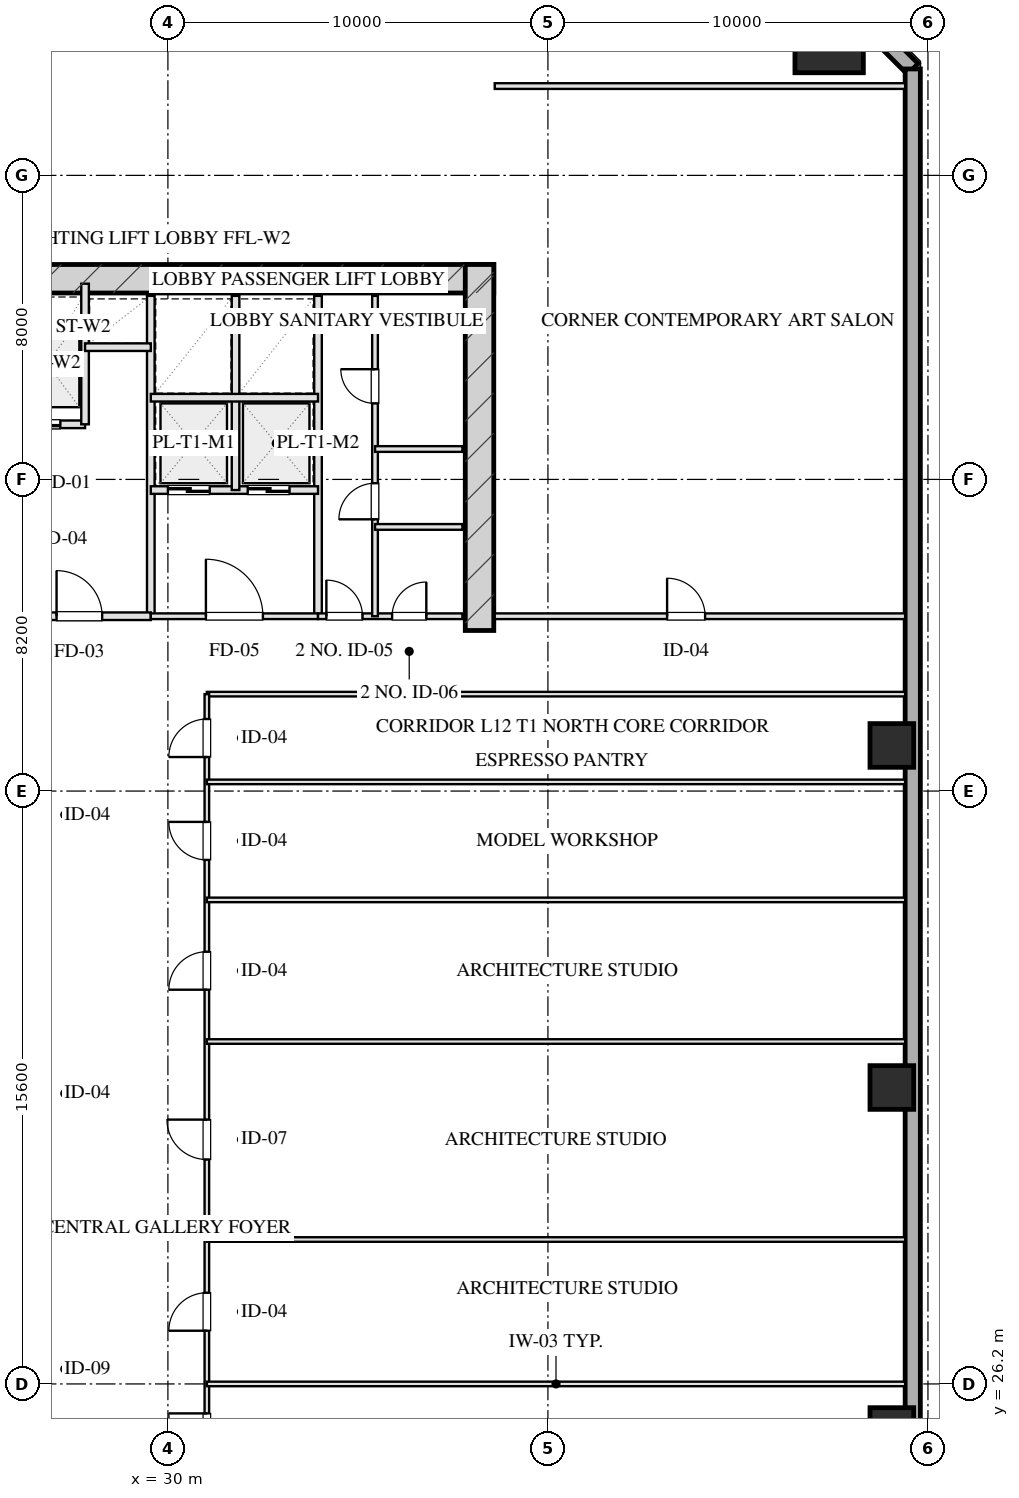
"""IFC4 building model, lengths in metres.
Left out: names, types, materials, properties, quantities, classifications, styles, units other than length and angle.
Written with IfcOpenShell. Run it as: python <this file> out.ifc"""

import sys

from ifc_helpers import new_model, si_unit, direction, frame, frame_2d, origin, origin_2d, place, context, subcontext, project, spatial, rectangle, hollow_rectangle, extrude, element, fill, save


model = new_model("IFC4")
c1 = context("Model", 3, precision=1e-05, world=origin(), true_north=direction((0.0, 1.0)))
c2 = subcontext(c1, "Body", "Model", "MODEL_VIEW")
j1 = project(units=[si_unit("LENGTHUNIT", "METRE"), si_unit("PLANEANGLEUNIT", "RADIAN")], contexts=[c1])
p1 = place(None, origin())
s1 = spatial("IfcSite", under=j1, at=p1, CompositionType="ELEMENT")
p2 = place(p1, origin())
s2 = spatial("IfcBuilding", under=s1, at=p2, CompositionType="ELEMENT")
p3 = place(p2, frame((0.0, 0.0, 54.05)))
s3 = spatial("IfcBuildingStorey", under=s2, at=p3, CompositionType="ELEMENT", Elevation=54.05)
p4 = place(p3, frame((21.425, 55.28, 0.0), z_axis=(0.0, 0.0, 1.0), x_axis=(1.0, 0.0, 0.0)))
e1 = element("IfcWall", 1, at=p4, inside=s3, PredefinedType="SHEAR", context=c2, shape_type="SweptSolid", body=[
    extrude(rectangle(XDim=17.15, YDim=0.75, at=frame_2d((8.575, 0.0))), origin(), (0.0, 0.0, 1.0), 3.45),
])
p5 = place(p3, frame((38.2, 46.025, 0.0), z_axis=(0.0, 0.0, 1.0), x_axis=(0.0, 1.0, 0.0)))
e2 = element("IfcWall", 2, at=p5, inside=s3, PredefinedType="SHEAR", context=c2, shape_type="SweptSolid", body=[
    extrude(rectangle(XDim=9.63, YDim=0.75, at=frame_2d((4.815, 0.0))), origin(), (0.0, 0.0, 1.0), 3.45),
])
p6 = place(p3, frame((47.4, 61.6, 0.0), z_axis=(0.0, 0.0, 1.0), x_axis=(1.0, 0.0, 0.0)))
e3 = element("IfcColumn", 3, at=p6, inside=s3, PredefinedType="COLUMN", context=c2, shape_type="SweptSolid", body=[
    extrude(hollow_rectangle(XDim=1.8, YDim=1.8, WallThickness=0.06, at=origin_2d()), origin(), (0.0, 0.0, 1.0), 3.451),
])
for number, where, z_axis, x_axis in (
    (4, (49.05, 25.0, 0.0), (0.0, 0.0, 1.0), (1.0, 0.0, 0.0)),
    (5, (49.05, 34.0, 0.0), (0.0, 0.0, 1.0), (1.0, 0.0, 0.0)),
    (6, (49.05, 43.0, 0.0), (0.0, 0.0, 1.0), (1.0, 0.0, 0.0)),
):
    element("IfcColumn", number, at=place(p3, frame(where, z_axis=z_axis, x_axis=x_axis)), inside=s3, PredefinedType="COLUMN", context=c2, shape_type="SweptSolid", body=[
        extrude(hollow_rectangle(XDim=1.15, YDim=1.15, WallThickness=0.04, at=origin_2d()), origin(), (0.0, 0.0, 1.0), 3.451),
    ])
p7 = place(p3, frame((46.6, 63.8, 0.0), z_axis=(0.0, 0.0, 1.0), x_axis=(0.707106781187, -0.707106781187, 0.0)))
e7 = element("IfcWall", 7, at=p7, inside=s3, PredefinedType="SOLIDWALL", context=c2, shape_type="SweptSolid", body=[
    extrude(rectangle(XDim=4.243, YDim=0.4, at=frame_2d((2.121, 0.0))), origin(), (0.0, 0.0, 1.0), 2.61),
])
p8 = place(p3, frame((49.6, 60.8, 0.0), z_axis=(0.0, 0.0, 1.0), x_axis=(0.0, -1.0, 0.0)))
e8 = element("IfcWall", 8, at=p8, inside=s3, PredefinedType="SOLIDWALL", context=c2, shape_type="SweptSolid", body=[
    extrude(rectangle(XDim=53.6, YDim=0.4, at=frame_2d((26.8, 0.0))), origin(), (0.0, 0.0, 1.0), 2.61),
])
p9 = place(p3, frame((29.55, 46.4, 0.0), z_axis=(0.0, 0.0, 1.0), x_axis=(0.0, 1.0, 0.0)))
e9 = element("IfcWall", 9, at=p9, inside=s3, PredefinedType="PARTITIONING", context=c2, shape_type="SweptSolid", body=[
    extrude(rectangle(XDim=8.43, YDim=0.2, at=frame_2d((4.215, 0.0))), origin(), (0.0, 0.0, 1.0), 3.175),
])
p10 = place(p3, frame((25.72, 46.4, 0.0), z_axis=(0.0, 0.0, 1.0), x_axis=(1.0, 0.0, 0.0)))
e10 = element("IfcWall", 10, at=p10, inside=s3, PredefinedType="PARTITIONING", context=c2, shape_type="SweptSolid", body=[
    extrude(rectangle(XDim=3.83, YDim=0.2, at=frame_2d((1.915, 0.0))), origin(), (0.0, 0.0, 1.0), 3.175),
])
p11 = place(p10, frame((1.35, 0.0, 0.0)))
e11 = element("IfcOpeningElement", 11, at=p11, cuts=e10, PredefinedType="OPENING", context=c2, shape_type="SweptSolid", body=[
    extrude(rectangle(XDim=1.2, YDim=2.05, at=frame_2d((0.6, 1.025))), frame((0.0, 0.11, 0.0), z_axis=(0.0, -1.0, 0.0), x_axis=(1.0, 0.0, 0.0)), (0.0, 0.0, 1.0), 0.22),
])
p12 = place(p3, frame((25.72, 51.45, 0.0), z_axis=(0.0, 0.0, 1.0), x_axis=(1.0, 0.0, 0.0)))
e12 = element("IfcWall", 12, at=p12, inside=s3, PredefinedType="PARTITIONING", context=c2, shape_type="SweptSolid", body=[
    extrude(rectangle(XDim=2.1, YDim=0.2, at=frame_2d((1.05, 0.0))), origin(), (0.0, 0.0, 1.0), 3.175),
])
p13 = place(p12, frame((0.35, 0.0, 0.0)))
e13 = element("IfcOpeningElement", 13, at=p13, cuts=e12, PredefinedType="OPENING", context=c2, shape_type="SweptSolid", body=[
    extrude(rectangle(XDim=1.1, YDim=2.05, at=frame_2d((0.55, 1.025))), frame((0.0, 0.11, 0.0), z_axis=(0.0, -1.0, 0.0), x_axis=(1.0, 0.0, 0.0)), (0.0, 0.0, 1.0), 0.22),
])
p14 = place(p3, frame((27.82, 51.45, 0.0), z_axis=(0.0, 0.0, 1.0), x_axis=(0.0, 1.0, 0.0)))
e14 = element("IfcWall", 14, at=p14, inside=s3, PredefinedType="PARTITIONING", context=c2, shape_type="SweptSolid", body=[
    extrude(rectangle(XDim=3.7, YDim=0.2, at=frame_2d((1.85, 0.0))), origin(), (0.0, 0.0, 1.0), 3.175),
])
p15 = place(p3, frame((27.82, 53.48, 0.0), z_axis=(0.0, 0.0, 1.0), x_axis=(1.0, 0.0, 0.0)))
e15 = element("IfcWall", 15, at=p15, inside=s3, PredefinedType="PARTITIONING", context=c2, shape_type="SweptSolid", body=[
    extrude(rectangle(XDim=1.73, YDim=0.2, at=frame_2d((0.865, 0.0))), origin(), (0.0, 0.0, 1.0), 3.175),
])
p16 = place(p3, frame((33.95, 46.4, 0.0), z_axis=(0.0, 0.0, 1.0), x_axis=(0.0, 1.0, 0.0)))
e16 = element("IfcWall", 16, at=p16, inside=s3, PredefinedType="PARTITIONING", context=c2, shape_type="SweptSolid", body=[
    extrude(rectangle(XDim=8.43, YDim=0.2, at=frame_2d((4.215, 0.0))), origin(), (0.0, 0.0, 1.0), 3.175),
])
p17 = place(p3, frame((29.55, 46.4, 0.0), z_axis=(0.0, 0.0, 1.0), x_axis=(1.0, 0.0, 0.0)))
e17 = element("IfcWall", 17, at=p17, inside=s3, PredefinedType="PARTITIONING", context=c2, shape_type="SweptSolid", body=[
    extrude(rectangle(XDim=4.4, YDim=0.15, at=frame_2d((2.2, 0.0))), origin(), (0.0, 0.0, 1.0), 3.175),
])
p18 = place(p17, frame((1.45, 0.0, 0.0)))
e18 = element("IfcOpeningElement", 18, at=p18, cuts=e17, PredefinedType="OPENING", context=c2, shape_type="SweptSolid", body=[
    extrude(rectangle(XDim=1.5, YDim=2.05, at=frame_2d((0.75, 1.025))), frame((0.0, 0.085, 0.0), z_axis=(0.0, -1.0, 0.0), x_axis=(1.0, 0.0, 0.0)), (0.0, 0.0, 1.0), 0.17),
])
p19 = place(p3, frame((29.55, 49.72, 0.0), z_axis=(0.0, 0.0, 1.0), x_axis=(1.0, 0.0, 0.0)))
e19 = element("IfcWall", 19, at=p19, inside=s3, PredefinedType="PARTITIONING", context=c2, shape_type="SweptSolid", body=[
    extrude(rectangle(XDim=4.4, YDim=0.2, at=frame_2d((2.2, 0.0))), origin(), (0.0, 0.0, 1.0), 3.175),
])
p20 = place(p19, frame((0.45, 0.0, 0.0)))
e20 = element("IfcOpeningElement", 20, at=p20, cuts=e19, PredefinedType="OPENING", context=c2, shape_type="SweptSolid", body=[
    extrude(rectangle(XDim=1.1, YDim=2.05, at=frame_2d((0.55, 1.025))), frame((0.0, 0.11, 0.0), z_axis=(0.0, -1.0, 0.0), x_axis=(1.0, 0.0, 0.0)), (0.0, 0.0, 1.0), 0.22),
])
p21 = place(p19, frame((2.55, 0.0, 0.0)))
e21 = element("IfcOpeningElement", 21, at=p21, cuts=e19, PredefinedType="OPENING", context=c2, shape_type="SweptSolid", body=[
    extrude(rectangle(XDim=1.1, YDim=2.05, at=frame_2d((0.55, 1.025))), frame((0.0, 0.11, 0.0), z_axis=(0.0, -1.0, 0.0), x_axis=(1.0, 0.0, 0.0)), (0.0, 0.0, 1.0), 0.22),
])
p22 = place(p3, frame((31.78, 49.72, 0.0), z_axis=(0.0, 0.0, 1.0), x_axis=(0.0, 1.0, 0.0)))
e22 = element("IfcWall", 22, at=p22, inside=s3, PredefinedType="PARTITIONING", context=c2, shape_type="SweptSolid", body=[
    extrude(rectangle(XDim=5.11, YDim=0.2, at=frame_2d((2.555, 0.0))), origin(), (0.0, 0.0, 1.0), 3.175),
])
p23 = place(p3, frame((29.55, 52.15, 0.0), z_axis=(0.0, 0.0, 1.0), x_axis=(1.0, 0.0, 0.0)))
e23 = element("IfcWall", 23, at=p23, inside=s3, PredefinedType="PARTITIONING", context=c2, shape_type="SweptSolid", body=[
    extrude(rectangle(XDim=4.4, YDim=0.2, at=frame_2d((2.2, 0.0))), origin(), (0.0, 0.0, 1.0), 3.175),
])
p24 = place(p3, frame((33.95, 46.4, 0.0), z_axis=(0.0, 0.0, 1.0), x_axis=(1.0, 0.0, 0.0)))
e24 = element("IfcWall", 24, at=p24, inside=s3, PredefinedType="PARTITIONING", context=c2, shape_type="SweptSolid", body=[
    extrude(rectangle(XDim=3.8, YDim=0.15, at=frame_2d((1.9, 0.0))), origin(), (0.0, 0.0, 1.0), 3.175),
])
p25 = place(p24, frame((0.22, 0.0, 0.0)))
e25 = element("IfcOpeningElement", 25, at=p25, cuts=e24, PredefinedType="OPENING", context=c2, shape_type="SweptSolid", body=[
    extrude(rectangle(XDim=0.95, YDim=2.05, at=frame_2d((0.475, 1.025))), frame((0.0, 0.085, 0.0), z_axis=(0.0, -1.0, 0.0), x_axis=(1.0, 0.0, 0.0)), (0.0, 0.0, 1.0), 0.17),
])
p26 = place(p24, frame((1.95, 0.0, 0.0)))
e26 = element("IfcOpeningElement", 26, at=p26, cuts=e24, PredefinedType="OPENING", context=c2, shape_type="SweptSolid", body=[
    extrude(rectangle(XDim=0.9, YDim=2.05, at=frame_2d((0.45, 1.025))), frame((0.0, 0.085, 0.0), z_axis=(0.0, -1.0, 0.0), x_axis=(1.0, 0.0, 0.0)), (0.0, 0.0, 1.0), 0.17),
])
p27 = place(p3, frame((35.45, 46.4, 0.0), z_axis=(0.0, 0.0, 1.0), x_axis=(0.0, 1.0, 0.0)))
e27 = element("IfcWall", 27, at=p27, inside=s3, PredefinedType="PARTITIONING", context=c2, shape_type="SweptSolid", body=[
    extrude(rectangle(XDim=8.43, YDim=0.15, at=frame_2d((4.215, 0.0))), origin(), (0.0, 0.0, 1.0), 2.765),
])
p28 = place(p27, frame((2.55, 0.0, 0.0)))
e28 = element("IfcOpeningElement", 28, at=p28, cuts=e27, PredefinedType="OPENING", context=c2, shape_type="SweptSolid", body=[
    extrude(rectangle(XDim=0.95, YDim=2.05, at=frame_2d((0.475, 1.025))), frame((0.0, 0.085, 0.0), z_axis=(0.0, -1.0, 0.0), x_axis=(1.0, 0.0, 0.0)), (0.0, 0.0, 1.0), 0.17),
])
p29 = place(p27, frame((5.6, 0.0, 0.0)))
e29 = element("IfcOpeningElement", 29, at=p29, cuts=e27, PredefinedType="OPENING", context=c2, shape_type="SweptSolid", body=[
    extrude(rectangle(XDim=0.9, YDim=2.05, at=frame_2d((0.45, 1.025))), frame((0.0, 0.085, 0.0), z_axis=(0.0, -1.0, 0.0), x_axis=(1.0, 0.0, 0.0)), (0.0, 0.0, 1.0), 0.17),
])
for number, where, z_axis, x_axis in (
    (30, (35.45, 50.8, 0.0), (0.0, 0.0, 1.0), (1.0, 0.0, 0.0)),
    (31, (35.45, 48.75, 0.0), (0.0, 0.0, 1.0), (1.0, 0.0, 0.0)),
):
    element("IfcWall", number, at=place(p3, frame(where, z_axis=z_axis, x_axis=x_axis)), inside=s3, PredefinedType="PARTITIONING", context=c2, shape_type="SweptSolid", body=[
        extrude(rectangle(XDim=2.3, YDim=0.15, at=frame_2d((1.15, 0.0))), origin(), (0.0, 0.0, 1.0), 3.175),
    ])
p30 = place(p3, frame((38.6, 60.35, 0.0), z_axis=(0.0, 0.0, 1.0), x_axis=(1.0, 0.0, 0.0)))
e32 = element("IfcWall", 32, at=p30, inside=s3, PredefinedType="PARTITIONING", context=c2, shape_type="SweptSolid", body=[
    extrude(rectangle(XDim=10.8, YDim=0.15, at=frame_2d((5.4, 0.0))), origin(), (0.0, 0.0, 1.0), 3.175),
])
p31 = place(p3, frame((38.6, 46.4, 0.0), z_axis=(0.0, 0.0, 1.0), x_axis=(1.0, 0.0, 0.0)))
e33 = element("IfcWall", 33, at=p31, inside=s3, PredefinedType="PARTITIONING", context=c2, shape_type="SweptSolid", body=[
    extrude(rectangle(XDim=10.8, YDim=0.15, at=frame_2d((5.4, 0.0))), origin(), (0.0, 0.0, 1.0), 3.175),
])
p32 = place(p31, frame((4.536, 0.0, 0.0)))
e34 = element("IfcOpeningElement", 34, at=p32, cuts=e33, PredefinedType="OPENING", context=c2, shape_type="SweptSolid", body=[
    extrude(rectangle(XDim=1.0, YDim=2.05, at=frame_2d((0.5, 1.025))), frame((0.0, 0.085, 0.0), z_axis=(0.0, -1.0, 0.0), x_axis=(1.0, 0.0, 0.0)), (0.0, 0.0, 1.0), 0.17),
])
p33 = place(p3, frame((31.025, 44.35, 0.0), z_axis=(0.0, 0.0, 1.0), x_axis=(1.0, 0.0, 0.0)))
e35 = element("IfcWall", 35, at=p33, inside=s3, PredefinedType="PARTITIONING", context=c2, shape_type="SweptSolid", body=[
    extrude(rectangle(XDim=18.375, YDim=0.12, at=frame_2d((9.188, 0.0))), origin(), (0.0, 0.0, 1.0), 3.175),
])
p34 = place(p3, frame((31.025, 23.65, 0.0), z_axis=(0.0, 0.0, 1.0), x_axis=(0.0, 1.0, 0.0)))
e36 = element("IfcWall", 36, at=p34, inside=s3, PredefinedType="PARTITIONING", context=c2, shape_type="SweptSolid", body=[
    extrude(rectangle(XDim=20.7, YDim=0.12, at=frame_2d((10.35, 0.0))), origin(), (0.0, 0.0, 1.0), 3.175),
])
p35 = place(p34, frame((0.775, 0.0, 0.0)))
e37 = element("IfcOpeningElement", 37, at=p35, cuts=e36, PredefinedType="OPENING", context=c2, shape_type="SweptSolid", body=[
    extrude(rectangle(XDim=1.0, YDim=2.05, at=frame_2d((0.5, 1.025))), frame((0.0, 0.07, 0.0), z_axis=(0.0, -1.0, 0.0), x_axis=(1.0, 0.0, 0.0)), (0.0, 0.0, 1.0), 0.14),
])
p36 = place(p34, frame((3.95, 0.0, 0.0)))
e38 = element("IfcOpeningElement", 38, at=p36, cuts=e36, PredefinedType="OPENING", context=c2, shape_type="SweptSolid", body=[
    extrude(rectangle(XDim=1.0, YDim=2.05, at=frame_2d((0.5, 1.025))), frame((0.0, 0.07, 0.0), z_axis=(0.0, -1.0, 0.0), x_axis=(1.0, 0.0, 0.0)), (0.0, 0.0, 1.0), 0.14),
])
p37 = place(p34, frame((8.455, 0.0, 0.0)))
e39 = element("IfcOpeningElement", 39, at=p37, cuts=e36, PredefinedType="OPENING", context=c2, shape_type="SweptSolid", body=[
    extrude(rectangle(XDim=1.05, YDim=2.05, at=frame_2d((0.525, 1.025))), frame((0.0, 0.07, 0.0), z_axis=(0.0, -1.0, 0.0), x_axis=(1.0, 0.0, 0.0)), (0.0, 0.0, 1.0), 0.14),
])
p38 = place(p34, frame((12.923, 0.0, 0.0)))
e40 = element("IfcOpeningElement", 40, at=p38, cuts=e36, PredefinedType="OPENING", context=c2, shape_type="SweptSolid", body=[
    extrude(rectangle(XDim=1.0, YDim=2.05, at=frame_2d((0.5, 1.025))), frame((0.0, 0.07, 0.0), z_axis=(0.0, -1.0, 0.0), x_axis=(1.0, 0.0, 0.0)), (0.0, 0.0, 1.0), 0.14),
])
p39 = place(p34, frame((16.338, 0.0, 0.0)))
e41 = element("IfcOpeningElement", 41, at=p39, cuts=e36, PredefinedType="OPENING", context=c2, shape_type="SweptSolid", body=[
    extrude(rectangle(XDim=1.0, YDim=2.05, at=frame_2d((0.5, 1.025))), frame((0.0, 0.07, 0.0), z_axis=(0.0, -1.0, 0.0), x_axis=(1.0, 0.0, 0.0)), (0.0, 0.0, 1.0), 0.14),
])
p40 = place(p34, frame((19.045, 0.0, 0.0)))
e42 = element("IfcOpeningElement", 42, at=p40, cuts=e36, PredefinedType="OPENING", context=c2, shape_type="SweptSolid", body=[
    extrude(rectangle(XDim=1.0, YDim=2.05, at=frame_2d((0.5, 1.025))), frame((0.0, 0.07, 0.0), z_axis=(0.0, -1.0, 0.0), x_axis=(1.0, 0.0, 0.0)), (0.0, 0.0, 1.0), 0.14),
])
for number, where, z_axis, x_axis in (
    (43, (31.025, 26.2, 0.0), (0.0, 0.0, 1.0), (1.0, 0.0, 0.0)),
    (44, (31.025, 30.0, 0.0), (0.0, 0.0, 1.0), (1.0, 0.0, 0.0)),
    (45, (31.025, 35.21, 0.0), (0.0, 0.0, 1.0), (1.0, 0.0, 0.0)),
    (46, (31.025, 38.936, 0.0), (0.0, 0.0, 1.0), (1.0, 0.0, 0.0)),
    (47, (31.025, 42.041, 0.0), (0.0, 0.0, 1.0), (1.0, 0.0, 0.0)),
):
    element("IfcWall", number, at=place(p3, frame(where, z_axis=z_axis, x_axis=x_axis)), inside=s3, PredefinedType="PARTITIONING", context=c2, shape_type="SweptSolid", body=[
        extrude(rectangle(XDim=18.375, YDim=0.12, at=frame_2d((9.188, 0.0))), origin(), (0.0, 0.0, 1.0), 3.175),
    ])
p41 = place(p11, origin())
e48 = element("IfcDoor", 48, at=p41, inside=s3, OperationType="SINGLE_SWING_LEFT", PredefinedType="DOOR", context=c2, shape_type="SweptSolid", body=[
    extrude(rectangle(XDim=1.2, YDim=2.05, at=frame_2d((0.6, 1.025))), frame((0.0, 0.025, 0.0), z_axis=(0.0, -1.0, 0.0), x_axis=(1.0, 0.0, 0.0)), (0.0, 0.0, 1.0), 0.05),
])
fill(e11, e48)
p42 = place(p13, origin())
e49 = element("IfcDoor", 49, at=p42, inside=s3, OperationType="DOUBLE_DOOR_SLIDING", PredefinedType="DOOR", context=c2, shape_type="SweptSolid", body=[
    extrude(rectangle(XDim=1.1, YDim=2.05, at=frame_2d((0.55, 1.025))), frame((0.0, 0.025, 0.0), z_axis=(0.0, -1.0, 0.0), x_axis=(1.0, 0.0, 0.0)), (0.0, 0.0, 1.0), 0.05),
])
fill(e13, e49)
p43 = place(p18, origin())
e50 = element("IfcDoor", 50, at=p43, inside=s3, OperationType="SINGLE_SWING_LEFT", PredefinedType="DOOR", context=c2, shape_type="SweptSolid", body=[
    extrude(rectangle(XDim=1.5, YDim=2.05, at=frame_2d((0.75, 1.025))), frame((0.0, 0.025, 0.0), z_axis=(0.0, -1.0, 0.0), x_axis=(1.0, 0.0, 0.0)), (0.0, 0.0, 1.0), 0.05),
])
fill(e18, e50)
p44 = place(p20, origin())
e51 = element("IfcDoor", 51, at=p44, inside=s3, OperationType="DOUBLE_DOOR_SLIDING", PredefinedType="DOOR", context=c2, shape_type="SweptSolid", body=[
    extrude(rectangle(XDim=1.1, YDim=2.05, at=frame_2d((0.55, 1.025))), frame((0.0, 0.025, 0.0), z_axis=(0.0, -1.0, 0.0), x_axis=(1.0, 0.0, 0.0)), (0.0, 0.0, 1.0), 0.05),
])
fill(e20, e51)
p45 = place(p21, origin())
e52 = element("IfcDoor", 52, at=p45, inside=s3, OperationType="DOUBLE_DOOR_SLIDING", PredefinedType="DOOR", context=c2, shape_type="SweptSolid", body=[
    extrude(rectangle(XDim=1.1, YDim=2.05, at=frame_2d((0.55, 1.025))), frame((0.0, 0.025, 0.0), z_axis=(0.0, -1.0, 0.0), x_axis=(1.0, 0.0, 0.0)), (0.0, 0.0, 1.0), 0.05),
])
fill(e21, e52)
p46 = place(p25, origin())
e53 = element("IfcDoor", 53, at=p46, inside=s3, OperationType="SINGLE_SWING_LEFT", PredefinedType="DOOR", context=c2, shape_type="SweptSolid", body=[
    extrude(rectangle(XDim=0.95, YDim=2.05, at=frame_2d((0.475, 1.025))), frame((0.0, 0.025, 0.0), z_axis=(0.0, -1.0, 0.0), x_axis=(1.0, 0.0, 0.0)), (0.0, 0.0, 1.0), 0.05),
])
fill(e25, e53)
p47 = place(p26, origin())
e54 = element("IfcDoor", 54, at=p47, inside=s3, OperationType="SINGLE_SWING_RIGHT", PredefinedType="DOOR", context=c2, shape_type="SweptSolid", body=[
    extrude(rectangle(XDim=0.9, YDim=2.05, at=frame_2d((0.45, 1.025))), frame((0.0, 0.025, 0.0), z_axis=(0.0, -1.0, 0.0), x_axis=(1.0, 0.0, 0.0)), (0.0, 0.0, 1.0), 0.05),
])
fill(e26, e54)
p48 = place(p28, origin())
e55 = element("IfcDoor", 55, at=p48, inside=s3, OperationType="SINGLE_SWING_LEFT", PredefinedType="DOOR", context=c2, shape_type="SweptSolid", body=[
    extrude(rectangle(XDim=0.95, YDim=2.05, at=frame_2d((0.475, 1.025))), frame((0.0, 0.025, 0.0), z_axis=(0.0, -1.0, 0.0), x_axis=(1.0, 0.0, 0.0)), (0.0, 0.0, 1.0), 0.05),
])
fill(e28, e55)
p49 = place(p29, origin())
e56 = element("IfcDoor", 56, at=p49, inside=s3, OperationType="SINGLE_SWING_RIGHT", PredefinedType="DOOR", context=c2, shape_type="SweptSolid", body=[
    extrude(rectangle(XDim=0.9, YDim=2.05, at=frame_2d((0.45, 1.025))), frame((0.0, 0.025, 0.0), z_axis=(0.0, -1.0, 0.0), x_axis=(1.0, 0.0, 0.0)), (0.0, 0.0, 1.0), 0.05),
])
fill(e29, e56)
p50 = place(p32, origin())
e57 = element("IfcDoor", 57, at=p50, inside=s3, OperationType="SINGLE_SWING_LEFT", PredefinedType="DOOR", context=c2, shape_type="SweptSolid", body=[
    extrude(rectangle(XDim=1.0, YDim=2.05, at=frame_2d((0.5, 1.025))), frame((0.0, 0.025, 0.0), z_axis=(0.0, -1.0, 0.0), x_axis=(1.0, 0.0, 0.0)), (0.0, 0.0, 1.0), 0.05),
])
fill(e34, e57)
p51 = place(p35, origin())
e58 = element("IfcDoor", 58, at=p51, inside=s3, OperationType="SINGLE_SWING_RIGHT", PredefinedType="DOOR", context=c2, shape_type="SweptSolid", body=[
    extrude(rectangle(XDim=1.0, YDim=2.05, at=frame_2d((0.5, 1.025))), frame((0.0, 0.025, 0.0), z_axis=(0.0, -1.0, 0.0), x_axis=(1.0, 0.0, 0.0)), (0.0, 0.0, 1.0), 0.05),
])
fill(e37, e58)
p52 = place(p36, origin())
e59 = element("IfcDoor", 59, at=p52, inside=s3, OperationType="SINGLE_SWING_LEFT", PredefinedType="DOOR", context=c2, shape_type="SweptSolid", body=[
    extrude(rectangle(XDim=1.0, YDim=2.05, at=frame_2d((0.5, 1.025))), frame((0.0, 0.025, 0.0), z_axis=(0.0, -1.0, 0.0), x_axis=(1.0, 0.0, 0.0)), (0.0, 0.0, 1.0), 0.05),
])
fill(e38, e59)
p53 = place(p37, origin())
e60 = element("IfcDoor", 60, at=p53, inside=s3, OperationType="SINGLE_SWING_RIGHT", PredefinedType="DOOR", context=c2, shape_type="SweptSolid", body=[
    extrude(rectangle(XDim=1.05, YDim=2.05, at=frame_2d((0.525, 1.025))), frame((0.0, 0.025, 0.0), z_axis=(0.0, -1.0, 0.0), x_axis=(1.0, 0.0, 0.0)), (0.0, 0.0, 1.0), 0.05),
])
fill(e39, e60)
p54 = place(p38, origin())
e61 = element("IfcDoor", 61, at=p54, inside=s3, OperationType="SINGLE_SWING_LEFT", PredefinedType="DOOR", context=c2, shape_type="SweptSolid", body=[
    extrude(rectangle(XDim=1.0, YDim=2.05, at=frame_2d((0.5, 1.025))), frame((0.0, 0.025, 0.0), z_axis=(0.0, -1.0, 0.0), x_axis=(1.0, 0.0, 0.0)), (0.0, 0.0, 1.0), 0.05),
])
fill(e40, e61)
p55 = place(p39, origin())
e62 = element("IfcDoor", 62, at=p55, inside=s3, OperationType="SINGLE_SWING_RIGHT", PredefinedType="DOOR", context=c2, shape_type="SweptSolid", body=[
    extrude(rectangle(XDim=1.0, YDim=2.05, at=frame_2d((0.5, 1.025))), frame((0.0, 0.025, 0.0), z_axis=(0.0, -1.0, 0.0), x_axis=(1.0, 0.0, 0.0)), (0.0, 0.0, 1.0), 0.05),
])
fill(e41, e62)
p56 = place(p40, origin())
e63 = element("IfcDoor", 63, at=p56, inside=s3, OperationType="SINGLE_SWING_LEFT", PredefinedType="DOOR", context=c2, shape_type="SweptSolid", body=[
    extrude(rectangle(XDim=1.0, YDim=2.05, at=frame_2d((0.5, 1.025))), frame((0.0, 0.025, 0.0), z_axis=(0.0, -1.0, 0.0), x_axis=(1.0, 0.0, 0.0)), (0.0, 0.0, 1.0), 0.05),
])
fill(e42, e63)
save(model, sys.argv[1])
